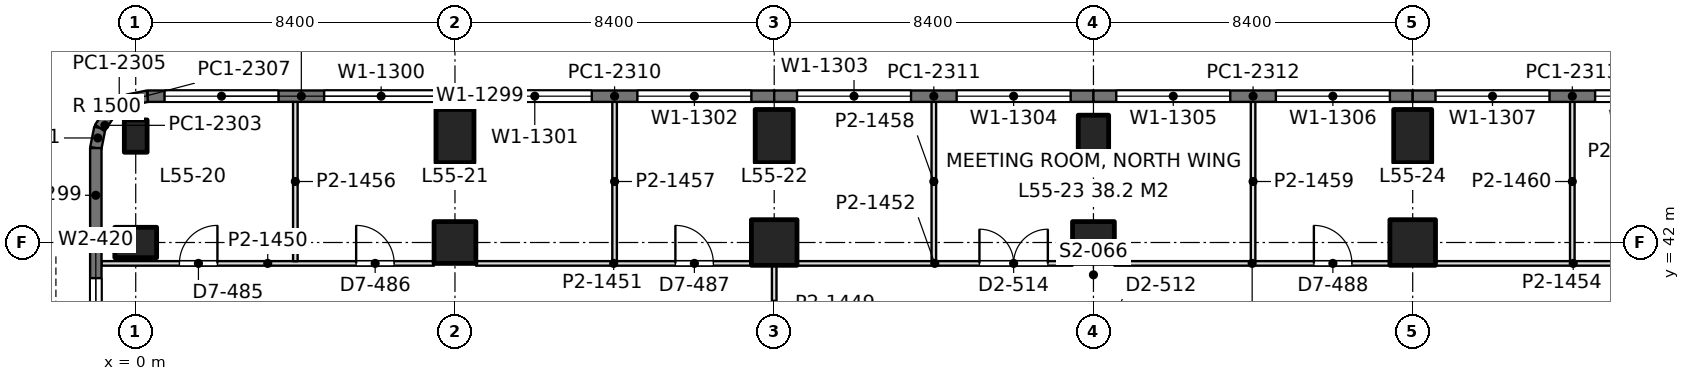
"""IFC4 building model, lengths in metres.
Left out: names, types, materials, properties, quantities, classifications, styles, units other than length and angle.
Written with IfcOpenShell. Run it as: python <this file> out.ifc"""

import sys

from ifc_helpers import new_model, si_unit, direction, frame, frame_2d, origin, origin_2d, place, context, subcontext, project, spatial, rectangle, extrude, element, fill, save


model = new_model("IFC4")
c1 = context("Model", 3, precision=1e-05, world=origin(), true_north=direction((0.0, 1.0)))
c2 = subcontext(c1, "Body", "Model", "MODEL_VIEW")
j1 = project(units=[si_unit("LENGTHUNIT", "METRE"), si_unit("PLANEANGLEUNIT", "RADIAN")], contexts=[c1])
p1 = place(None, origin())
s1 = spatial("IfcSite", under=j1, at=p1, CompositionType="ELEMENT")
p2 = place(p1, origin())
s2 = spatial("IfcBuilding", under=s1, at=p2, CompositionType="ELEMENT")
p3 = place(p2, frame((0.0, 0.0, 240.6)))
s3 = spatial("IfcBuildingStorey", under=s2, at=p3, CompositionType="ELEMENT", Elevation=240.6)
p4 = place(p3, frame((0.0, 42.0, 0.0), z_axis=(0.0, 0.0, 1.0), x_axis=(0.0, 1.0, 0.0)))
e1 = element("IfcColumn", 1, at=p4, inside=s3, PredefinedType="COLUMN", context=c2, shape_type="SweptSolid", body=[
    extrude(rectangle(XDim=0.8, YDim=1.1, at=origin_2d()), origin(), (0.0, 0.0, 1.0), 4.2),
])
p5 = place(p3, frame((0.0, 44.8, 0.0), z_axis=(0.0, 0.0, 1.0), x_axis=(1.0, 0.0, 0.0)))
e2 = element("IfcColumn", 2, at=p5, inside=s3, PredefinedType="COLUMN", context=c2, shape_type="SweptSolid", body=[
    extrude(rectangle(XDim=0.6, YDim=0.85, at=origin_2d()), origin(), (0.0, 0.0, 1.0), 4.2),
])
p6 = place(p3, frame((8.4, 42.0, 0.0), z_axis=(0.0, 0.0, 1.0), x_axis=(1.0, 0.0, 0.0)))
e3 = element("IfcColumn", 3, at=p6, inside=s3, PredefinedType="COLUMN", context=c2, shape_type="SweptSolid", body=[
    extrude(rectangle(XDim=1.1, YDim=1.1, at=origin_2d()), origin(), (0.0, 0.0, 1.0), 4.2),
])
p7 = place(p3, frame((8.4, 44.8, 0.0), z_axis=(0.0, 0.0, 1.0), x_axis=(1.0, 0.0, 0.0)))
e4 = element("IfcColumn", 4, at=p7, inside=s3, PredefinedType="COLUMN", context=c2, shape_type="SweptSolid", body=[
    extrude(rectangle(XDim=1.0, YDim=1.4, at=origin_2d()), origin(), (0.0, 0.0, 1.0), 4.2),
])
p8 = place(p3, frame((16.8, 42.0, 0.0), z_axis=(0.0, 0.0, 1.0), x_axis=(1.0, 0.0, 0.0)))
e5 = element("IfcColumn", 5, at=p8, inside=s3, PredefinedType="COLUMN", context=c2, shape_type="SweptSolid", body=[
    extrude(rectangle(XDim=1.2, YDim=1.2, at=origin_2d()), origin(), (0.0, 0.0, 1.0), 4.2),
])
p9 = place(p3, frame((16.8, 44.8, 0.0), z_axis=(0.0, 0.0, 1.0), x_axis=(1.0, 0.0, 0.0)))
e6 = element("IfcColumn", 6, at=p9, inside=s3, PredefinedType="COLUMN", context=c2, shape_type="SweptSolid", body=[
    extrude(rectangle(XDim=1.0, YDim=1.4, at=origin_2d()), origin(), (0.0, 0.0, 1.0), 4.2),
])
p10 = place(p3, frame((25.2, 42.0, 0.0), z_axis=(0.0, 0.0, 1.0), x_axis=(1.0, 0.0, 0.0)))
e7 = element("IfcColumn", 7, at=p10, inside=s3, PredefinedType="COLUMN", context=c2, shape_type="SweptSolid", body=[
    extrude(rectangle(XDim=1.1, YDim=1.1, at=origin_2d()), origin(), (0.0, 0.0, 1.0), 4.2),
])
p11 = place(p3, frame((25.2, 44.8, 0.0), z_axis=(0.0, 0.0, 1.0), x_axis=(1.0, 0.0, 0.0)))
e8 = element("IfcColumn", 8, at=p11, inside=s3, PredefinedType="COLUMN", context=c2, shape_type="SweptSolid", body=[
    extrude(rectangle(XDim=0.8, YDim=1.1, at=origin_2d()), origin(), (0.0, 0.0, 1.0), 4.2),
])
p12 = place(p3, frame((33.6, 42.0, 0.0), z_axis=(0.0, 0.0, 1.0), x_axis=(1.0, 0.0, 0.0)))
e9 = element("IfcColumn", 9, at=p12, inside=s3, PredefinedType="COLUMN", context=c2, shape_type="SweptSolid", body=[
    extrude(rectangle(XDim=1.2, YDim=1.2, at=origin_2d()), origin(), (0.0, 0.0, 1.0), 4.2),
])
p13 = place(p3, frame((33.6, 44.8, 0.0), z_axis=(0.0, 0.0, 1.0), x_axis=(1.0, 0.0, 0.0)))
e10 = element("IfcColumn", 10, at=p13, inside=s3, PredefinedType="COLUMN", context=c2, shape_type="SweptSolid", body=[
    extrude(rectangle(XDim=1.0, YDim=1.4, at=origin_2d()), origin(), (0.0, 0.0, 1.0), 4.2),
])
p14 = place(p3, frame((-1.05, 37.725, 0.0), z_axis=(0.0, 0.0, 1.0), x_axis=(0.0, 1.0, 0.0)))
e11 = element("IfcWall", 11, at=p14, inside=s3, PredefinedType="SOLIDWALL", context=c2, shape_type="SweptSolid", body=[
    extrude(rectangle(XDim=4.275, YDim=0.3, at=frame_2d((2.137, 0.0))), origin(), (0.0, 0.0, 1.0), 4.0),
])
p15 = place(p14, frame((0.938, 0.0, 0.9)))
e12 = element("IfcOpeningElement", 12, at=p15, cuts=e11, PredefinedType="OPENING", context=c2, shape_type="SweptSolid", body=[
    extrude(rectangle(XDim=2.4, YDim=1.9, at=frame_2d((1.2, 0.95))), frame((0.0, 0.16, 0.0), z_axis=(0.0, -1.0, 0.0), x_axis=(1.0, 0.0, 0.0)), (0.0, 0.0, 1.0), 0.32),
])
p16 = place(p3, frame((-1.05, 42.0, 0.0), z_axis=(0.0, 0.0, 1.0), x_axis=(0.0, 1.0, 0.0)))
e13 = element("IfcWall", 13, at=p16, inside=s3, PredefinedType="SOLIDWALL", context=c2, shape_type="SweptSolid", body=[
    extrude(rectangle(XDim=2.485, YDim=0.3, at=frame_2d((1.243, 0.0))), origin(), (0.0, 0.0, 1.0), 4.0),
])
p17 = place(p3, frame((-1.05, 44.485, 0.0), z_axis=(0.0, 0.0, 1.0), x_axis=(0.195073962632, 0.980788534345, 0.0)))
e14 = element("IfcWall", 14, at=p17, inside=s3, PredefinedType="SOLIDWALL", context=c2, shape_type="SweptSolid", body=[
    extrude(rectangle(XDim=0.541, YDim=0.3, at=frame_2d((0.271, 0.0))), origin(), (0.0, 0.0, 1.0), 4.0),
])
p18 = place(p3, frame((-0.945, 45.015, 0.0), z_axis=(0.0, 0.0, 1.0), x_axis=(0.55534295404, 0.831621430339, 0.0)))
e15 = element("IfcWall", 15, at=p18, inside=s3, PredefinedType="SOLIDWALL", context=c2, shape_type="SweptSolid", body=[
    extrude(rectangle(XDim=0.526, YDim=0.3, at=frame_2d((0.263, 0.0))), origin(), (0.0, 0.0, 1.0), 4.0),
])
p19 = place(p3, frame((-0.653, 45.453, 0.0), z_axis=(0.0, 0.0, 1.0), x_axis=(0.831692711774, 0.555236195849, 0.0)))
e16 = element("IfcWall", 16, at=p19, inside=s3, PredefinedType="SOLIDWALL", context=c2, shape_type="SweptSolid", body=[
    extrude(rectangle(XDim=0.525, YDim=0.3, at=frame_2d((0.263, 0.0))), origin(), (0.0, 0.0, 1.0), 4.0),
])
p20 = place(p3, frame((-0.216, 45.744, 0.0), z_axis=(0.0, 0.0, 1.0), x_axis=(0.980702050465, 0.1955082817, 0.0)))
e17 = element("IfcWall", 17, at=p20, inside=s3, PredefinedType="SOLIDWALL", context=c2, shape_type="SweptSolid", body=[
    extrude(rectangle(XDim=0.541, YDim=0.3, at=frame_2d((0.271, 0.0))), origin(), (0.0, 0.0, 1.0), 4.0),
])
p21 = place(p3, frame((0.315, 45.85, 0.0), z_axis=(0.0, 0.0, 1.0), x_axis=(1.0, 0.0, 0.0)))
e18 = element("IfcWall", 18, at=p21, inside=s3, PredefinedType="SOLIDWALL", context=c2, shape_type="SweptSolid", body=[
    extrude(rectangle(XDim=8.085, YDim=0.3, at=frame_2d((4.042, 0.0))), origin(), (0.0, 0.0, 1.0), 4.0),
])
p22 = place(p21, frame((0.443, 0.0, 0.9)))
e19 = element("IfcOpeningElement", 19, at=p22, cuts=e18, PredefinedType="OPENING", context=c2, shape_type="SweptSolid", body=[
    extrude(rectangle(XDim=3.0, YDim=1.9, at=frame_2d((1.5, 0.95))), frame((0.0, 0.16, 0.0), z_axis=(0.0, -1.0, 0.0), x_axis=(1.0, 0.0, 0.0)), (0.0, 0.0, 1.0), 0.32),
])
p23 = place(p21, frame((4.643, 0.0, 0.9)))
e20 = element("IfcOpeningElement", 20, at=p23, cuts=e18, PredefinedType="OPENING", context=c2, shape_type="SweptSolid", body=[
    extrude(rectangle(XDim=3.0, YDim=1.9, at=frame_2d((1.5, 0.95))), frame((0.0, 0.16, 0.0), z_axis=(0.0, -1.0, 0.0), x_axis=(1.0, 0.0, 0.0)), (0.0, 0.0, 1.0), 0.32),
])
p24 = place(p3, frame((8.4, 45.85, 0.0), z_axis=(0.0, 0.0, 1.0), x_axis=(1.0, 0.0, 0.0)))
e21 = element("IfcWall", 21, at=p24, inside=s3, PredefinedType="SOLIDWALL", context=c2, shape_type="SweptSolid", body=[
    extrude(rectangle(XDim=8.4, YDim=0.3, at=frame_2d((4.2, 0.0))), origin(), (0.0, 0.0, 1.0), 4.0),
])
p25 = place(p24, frame((0.6, 0.0, 0.9)))
e22 = element("IfcOpeningElement", 22, at=p25, cuts=e21, PredefinedType="OPENING", context=c2, shape_type="SweptSolid", body=[
    extrude(rectangle(XDim=3.0, YDim=1.9, at=frame_2d((1.5, 0.95))), frame((0.0, 0.16, 0.0), z_axis=(0.0, -1.0, 0.0), x_axis=(1.0, 0.0, 0.0)), (0.0, 0.0, 1.0), 0.32),
])
p26 = place(p24, frame((4.8, 0.0, 0.9)))
e23 = element("IfcOpeningElement", 23, at=p26, cuts=e21, PredefinedType="OPENING", context=c2, shape_type="SweptSolid", body=[
    extrude(rectangle(XDim=3.0, YDim=1.9, at=frame_2d((1.5, 0.95))), frame((0.0, 0.16, 0.0), z_axis=(0.0, -1.0, 0.0), x_axis=(1.0, 0.0, 0.0)), (0.0, 0.0, 1.0), 0.32),
])
p27 = place(p3, frame((16.8, 45.85, 0.0), z_axis=(0.0, 0.0, 1.0), x_axis=(1.0, 0.0, 0.0)))
e24 = element("IfcWall", 24, at=p27, inside=s3, PredefinedType="SOLIDWALL", context=c2, shape_type="SweptSolid", body=[
    extrude(rectangle(XDim=8.4, YDim=0.3, at=frame_2d((4.2, 0.0))), origin(), (0.0, 0.0, 1.0), 4.0),
])
p28 = place(p27, frame((0.6, 0.0, 0.9)))
e25 = element("IfcOpeningElement", 25, at=p28, cuts=e24, PredefinedType="OPENING", context=c2, shape_type="SweptSolid", body=[
    extrude(rectangle(XDim=3.0, YDim=1.9, at=frame_2d((1.5, 0.95))), frame((0.0, 0.16, 0.0), z_axis=(0.0, -1.0, 0.0), x_axis=(1.0, 0.0, 0.0)), (0.0, 0.0, 1.0), 0.32),
])
p29 = place(p27, frame((4.8, 0.0, 0.9)))
e26 = element("IfcOpeningElement", 26, at=p29, cuts=e24, PredefinedType="OPENING", context=c2, shape_type="SweptSolid", body=[
    extrude(rectangle(XDim=3.0, YDim=1.9, at=frame_2d((1.5, 0.95))), frame((0.0, 0.16, 0.0), z_axis=(0.0, -1.0, 0.0), x_axis=(1.0, 0.0, 0.0)), (0.0, 0.0, 1.0), 0.32),
])
p30 = place(p3, frame((25.2, 45.85, 0.0), z_axis=(0.0, 0.0, 1.0), x_axis=(1.0, 0.0, 0.0)))
e27 = element("IfcWall", 27, at=p30, inside=s3, PredefinedType="SOLIDWALL", context=c2, shape_type="SweptSolid", body=[
    extrude(rectangle(XDim=8.4, YDim=0.3, at=frame_2d((4.2, 0.0))), origin(), (0.0, 0.0, 1.0), 4.0),
])
p31 = place(p30, frame((0.6, 0.0, 0.9)))
e28 = element("IfcOpeningElement", 28, at=p31, cuts=e27, PredefinedType="OPENING", context=c2, shape_type="SweptSolid", body=[
    extrude(rectangle(XDim=3.0, YDim=1.9, at=frame_2d((1.5, 0.95))), frame((0.0, 0.16, 0.0), z_axis=(0.0, -1.0, 0.0), x_axis=(1.0, 0.0, 0.0)), (0.0, 0.0, 1.0), 0.32),
])
p32 = place(p30, frame((4.8, 0.0, 0.9)))
e29 = element("IfcOpeningElement", 29, at=p32, cuts=e27, PredefinedType="OPENING", context=c2, shape_type="SweptSolid", body=[
    extrude(rectangle(XDim=3.0, YDim=1.9, at=frame_2d((1.5, 0.95))), frame((0.0, 0.16, 0.0), z_axis=(0.0, -1.0, 0.0), x_axis=(1.0, 0.0, 0.0)), (0.0, 0.0, 1.0), 0.32),
])
p33 = place(p3, frame((33.6, 45.85, 0.0), z_axis=(0.0, 0.0, 1.0), x_axis=(1.0, 0.0, 0.0)))
e30 = element("IfcWall", 30, at=p33, inside=s3, PredefinedType="SOLIDWALL", context=c2, shape_type="SweptSolid", body=[
    extrude(rectangle(XDim=8.4, YDim=0.3, at=frame_2d((4.2, 0.0))), origin(), (0.0, 0.0, 1.0), 4.0),
])
p34 = place(p33, frame((0.6, 0.0, 0.9)))
e31 = element("IfcOpeningElement", 31, at=p34, cuts=e30, PredefinedType="OPENING", context=c2, shape_type="SweptSolid", body=[
    extrude(rectangle(XDim=3.0, YDim=1.9, at=frame_2d((1.5, 0.95))), frame((0.0, 0.16, 0.0), z_axis=(0.0, -1.0, 0.0), x_axis=(1.0, 0.0, 0.0)), (0.0, 0.0, 1.0), 0.32),
])
p35 = place(p33, frame((4.8, 0.0, 0.9)))
e32 = element("IfcOpeningElement", 32, at=p35, cuts=e30, PredefinedType="OPENING", context=c2, shape_type="SweptSolid", body=[
    extrude(rectangle(XDim=3.0, YDim=1.9, at=frame_2d((1.5, 0.95))), frame((0.0, 0.16, 0.0), z_axis=(0.0, -1.0, 0.0), x_axis=(1.0, 0.0, 0.0)), (0.0, 0.0, 1.0), 0.32),
])
p36 = place(p3, frame((-0.902, 41.45, 0.0), z_axis=(0.0, 0.0, 1.0), x_axis=(1.0, 0.0, 0.0)))
e33 = element("IfcWall", 33, at=p36, inside=s3, PredefinedType="PARTITIONING", context=c2, shape_type="SweptSolid", body=[
    extrude(rectangle(XDim=8.751, YDim=0.12, at=frame_2d((4.375, 0.0))), origin(), (0.0, 0.0, 1.0), 3.4),
])
p37 = place(p36, frame((2.052, 0.0, 0.0)))
e34 = element("IfcOpeningElement", 34, at=p37, cuts=e33, PredefinedType="OPENING", context=c2, shape_type="SweptSolid", body=[
    extrude(rectangle(XDim=1.0, YDim=2.4, at=frame_2d((0.5, 1.2))), frame((0.0, 0.07, 0.0), z_axis=(0.0, -1.0, 0.0), x_axis=(1.0, 0.0, 0.0)), (0.0, 0.0, 1.0), 0.14),
])
p38 = place(p36, frame((6.702, 0.0, 0.0)))
e35 = element("IfcOpeningElement", 35, at=p38, cuts=e33, PredefinedType="OPENING", context=c2, shape_type="SweptSolid", body=[
    extrude(rectangle(XDim=1.0, YDim=2.4, at=frame_2d((0.5, 1.2))), frame((0.0, 0.07, 0.0), z_axis=(0.0, -1.0, 0.0), x_axis=(1.0, 0.0, 0.0)), (0.0, 0.0, 1.0), 0.14),
])
p39 = place(p3, frame((8.951, 41.45, 0.0), z_axis=(0.0, 0.0, 1.0), x_axis=(1.0, 0.0, 0.0)))
e36 = element("IfcWall", 36, at=p39, inside=s3, PredefinedType="PARTITIONING", context=c2, shape_type="SweptSolid", body=[
    extrude(rectangle(XDim=7.25, YDim=0.12, at=frame_2d((3.625, 0.0))), origin(), (0.0, 0.0, 1.0), 3.4),
])
p40 = place(p39, frame((5.249, 0.0, 0.0)))
e37 = element("IfcOpeningElement", 37, at=p40, cuts=e36, PredefinedType="OPENING", context=c2, shape_type="SweptSolid", body=[
    extrude(rectangle(XDim=1.0, YDim=2.4, at=frame_2d((0.5, 1.2))), frame((0.0, 0.07, 0.0), z_axis=(0.0, -1.0, 0.0), x_axis=(1.0, 0.0, 0.0)), (0.0, 0.0, 1.0), 0.14),
])
p41 = place(p3, frame((17.399, 41.45, 0.0), z_axis=(0.0, 0.0, 1.0), x_axis=(1.0, 0.0, 0.0)))
e38 = element("IfcWall", 38, at=p41, inside=s3, PredefinedType="PARTITIONING", context=c2, shape_type="SweptSolid", body=[
    extrude(rectangle(XDim=7.25, YDim=0.12, at=frame_2d((3.625, 0.0))), origin(), (0.0, 0.0, 1.0), 3.4),
])
p42 = place(p41, frame((4.801, 0.0, 0.0)))
e39 = element("IfcOpeningElement", 39, at=p42, cuts=e38, PredefinedType="OPENING", context=c2, shape_type="SweptSolid", body=[
    extrude(rectangle(XDim=1.8, YDim=2.2, at=frame_2d((0.9, 1.1))), frame((0.0, 0.07, 0.0), z_axis=(0.0, -1.0, 0.0), x_axis=(1.0, 0.0, 0.0)), (0.0, 0.0, 1.0), 0.14),
])
p43 = place(p3, frame((25.751, 41.45, 0.0), z_axis=(0.0, 0.0, 1.0), x_axis=(1.0, 0.0, 0.0)))
e40 = element("IfcWall", 40, at=p43, inside=s3, PredefinedType="PARTITIONING", context=c2, shape_type="SweptSolid", body=[
    extrude(rectangle(XDim=7.25, YDim=0.12, at=frame_2d((3.625, 0.0))), origin(), (0.0, 0.0, 1.0), 3.4),
])
p44 = place(p43, frame((5.249, 0.0, 0.0)))
e41 = element("IfcOpeningElement", 41, at=p44, cuts=e40, PredefinedType="OPENING", context=c2, shape_type="SweptSolid", body=[
    extrude(rectangle(XDim=1.0, YDim=2.4, at=frame_2d((0.5, 1.2))), frame((0.0, 0.07, 0.0), z_axis=(0.0, -1.0, 0.0), x_axis=(1.0, 0.0, 0.0)), (0.0, 0.0, 1.0), 0.14),
])
p45 = place(p3, frame((34.199, 41.45, 0.0), z_axis=(0.0, 0.0, 1.0), x_axis=(1.0, 0.0, 0.0)))
e42 = element("IfcWall", 42, at=p45, inside=s3, PredefinedType="PARTITIONING", context=c2, shape_type="SweptSolid", body=[
    extrude(rectangle(XDim=7.25, YDim=0.12, at=frame_2d((3.625, 0.0))), origin(), (0.0, 0.0, 1.0), 3.4),
])
p46 = place(p45, frame((5.201, 0.0, 0.0)))
e43 = element("IfcOpeningElement", 43, at=p46, cuts=e42, PredefinedType="OPENING", context=c2, shape_type="SweptSolid", body=[
    extrude(rectangle(XDim=1.0, YDim=2.4, at=frame_2d((0.5, 1.2))), frame((0.0, 0.07, 0.0), z_axis=(0.0, -1.0, 0.0), x_axis=(1.0, 0.0, 0.0)), (0.0, 0.0, 1.0), 0.14),
])
for number, where, z_axis, x_axis in (
    (44, (4.2, 41.508, 0.0), (0.0, 0.0, 1.0), (0.0, 1.0, 0.0)),
    (45, (12.6, 41.508, 0.0), (0.0, 0.0, 1.0), (0.0, 1.0, 0.0)),
    (46, (21.0, 41.508, 0.0), (0.0, 0.0, 1.0), (0.0, 1.0, 0.0)),
    (47, (29.4, 41.508, 0.0), (0.0, 0.0, 1.0), (0.0, 1.0, 0.0)),
    (48, (37.8, 41.508, 0.0), (0.0, 0.0, 1.0), (0.0, 1.0, 0.0)),
):
    element("IfcWall", number, at=place(p3, frame(where, z_axis=z_axis, x_axis=x_axis)), inside=s3, PredefinedType="PARTITIONING", context=c2, shape_type="SweptSolid", body=[
        extrude(rectangle(XDim=4.194, YDim=0.12, at=frame_2d((2.097, 0.0))), origin(), (0.0, 0.0, 1.0), 3.3),
    ])
p47 = place(p3, frame((16.8, 39.358, 0.0), z_axis=(0.0, 0.0, 1.0), x_axis=(0.0, 1.0, 0.0)))
e49 = element("IfcWall", 49, at=p47, inside=s3, PredefinedType="PARTITIONING", context=c2, shape_type="SweptSolid", body=[
    extrude(rectangle(XDim=2.043, YDim=0.12, at=frame_2d((1.021, 0.0))), origin(), (0.0, 0.0, 1.0), 3.543),
])
p48 = place(p15, origin())
e50 = element("IfcWindow", 50, at=p48, inside=s3, PartitioningType="SINGLE_PANEL", PredefinedType="WINDOW", context=c2, shape_type="SweptSolid", body=[
    extrude(rectangle(XDim=2.4, YDim=1.9, at=frame_2d((1.2, 0.95))), frame((0.0, 0.03, 0.0), z_axis=(0.0, -1.0, 0.0), x_axis=(1.0, 0.0, 0.0)), (0.0, 0.0, 1.0), 0.06),
])
fill(e12, e50)
p49 = place(p22, origin())
e51 = element("IfcWindow", 51, at=p49, inside=s3, PartitioningType="SINGLE_PANEL", PredefinedType="WINDOW", context=c2, shape_type="SweptSolid", body=[
    extrude(rectangle(XDim=3.0, YDim=1.9, at=frame_2d((1.5, 0.95))), frame((0.0, 0.03, 0.0), z_axis=(0.0, -1.0, 0.0), x_axis=(1.0, 0.0, 0.0)), (0.0, 0.0, 1.0), 0.06),
])
fill(e19, e51)
p50 = place(p23, origin())
e52 = element("IfcWindow", 52, at=p50, inside=s3, PartitioningType="SINGLE_PANEL", PredefinedType="WINDOW", context=c2, shape_type="SweptSolid", body=[
    extrude(rectangle(XDim=3.0, YDim=1.9, at=frame_2d((1.5, 0.95))), frame((0.0, 0.03, 0.0), z_axis=(0.0, -1.0, 0.0), x_axis=(1.0, 0.0, 0.0)), (0.0, 0.0, 1.0), 0.06),
])
fill(e20, e52)
p51 = place(p25, origin())
e53 = element("IfcWindow", 53, at=p51, inside=s3, PartitioningType="SINGLE_PANEL", PredefinedType="WINDOW", context=c2, shape_type="SweptSolid", body=[
    extrude(rectangle(XDim=3.0, YDim=1.9, at=frame_2d((1.5, 0.95))), frame((0.0, 0.03, 0.0), z_axis=(0.0, -1.0, 0.0), x_axis=(1.0, 0.0, 0.0)), (0.0, 0.0, 1.0), 0.06),
])
fill(e22, e53)
p52 = place(p26, origin())
e54 = element("IfcWindow", 54, at=p52, inside=s3, PartitioningType="SINGLE_PANEL", PredefinedType="WINDOW", context=c2, shape_type="SweptSolid", body=[
    extrude(rectangle(XDim=3.0, YDim=1.9, at=frame_2d((1.5, 0.95))), frame((0.0, 0.03, 0.0), z_axis=(0.0, -1.0, 0.0), x_axis=(1.0, 0.0, 0.0)), (0.0, 0.0, 1.0), 0.06),
])
fill(e23, e54)
p53 = place(p28, origin())
e55 = element("IfcWindow", 55, at=p53, inside=s3, PartitioningType="SINGLE_PANEL", PredefinedType="WINDOW", context=c2, shape_type="SweptSolid", body=[
    extrude(rectangle(XDim=3.0, YDim=1.9, at=frame_2d((1.5, 0.95))), frame((0.0, 0.03, 0.0), z_axis=(0.0, -1.0, 0.0), x_axis=(1.0, 0.0, 0.0)), (0.0, 0.0, 1.0), 0.06),
])
fill(e25, e55)
p54 = place(p29, origin())
e56 = element("IfcWindow", 56, at=p54, inside=s3, PartitioningType="SINGLE_PANEL", PredefinedType="WINDOW", context=c2, shape_type="SweptSolid", body=[
    extrude(rectangle(XDim=3.0, YDim=1.9, at=frame_2d((1.5, 0.95))), frame((0.0, 0.03, 0.0), z_axis=(0.0, -1.0, 0.0), x_axis=(1.0, 0.0, 0.0)), (0.0, 0.0, 1.0), 0.06),
])
fill(e26, e56)
p55 = place(p31, origin())
e57 = element("IfcWindow", 57, at=p55, inside=s3, PartitioningType="SINGLE_PANEL", PredefinedType="WINDOW", context=c2, shape_type="SweptSolid", body=[
    extrude(rectangle(XDim=3.0, YDim=1.9, at=frame_2d((1.5, 0.95))), frame((0.0, 0.03, 0.0), z_axis=(0.0, -1.0, 0.0), x_axis=(1.0, 0.0, 0.0)), (0.0, 0.0, 1.0), 0.06),
])
fill(e28, e57)
p56 = place(p32, origin())
e58 = element("IfcWindow", 58, at=p56, inside=s3, PartitioningType="SINGLE_PANEL", PredefinedType="WINDOW", context=c2, shape_type="SweptSolid", body=[
    extrude(rectangle(XDim=3.0, YDim=1.9, at=frame_2d((1.5, 0.95))), frame((0.0, 0.03, 0.0), z_axis=(0.0, -1.0, 0.0), x_axis=(1.0, 0.0, 0.0)), (0.0, 0.0, 1.0), 0.06),
])
fill(e29, e58)
p57 = place(p34, origin())
e59 = element("IfcWindow", 59, at=p57, inside=s3, PartitioningType="SINGLE_PANEL", PredefinedType="WINDOW", context=c2, shape_type="SweptSolid", body=[
    extrude(rectangle(XDim=3.0, YDim=1.9, at=frame_2d((1.5, 0.95))), frame((0.0, 0.03, 0.0), z_axis=(0.0, -1.0, 0.0), x_axis=(1.0, 0.0, 0.0)), (0.0, 0.0, 1.0), 0.06),
])
fill(e31, e59)
p58 = place(p35, origin())
e60 = element("IfcWindow", 60, at=p58, inside=s3, PartitioningType="SINGLE_PANEL", PredefinedType="WINDOW", context=c2, shape_type="SweptSolid", body=[
    extrude(rectangle(XDim=3.0, YDim=1.9, at=frame_2d((1.5, 0.95))), frame((0.0, 0.03, 0.0), z_axis=(0.0, -1.0, 0.0), x_axis=(1.0, 0.0, 0.0)), (0.0, 0.0, 1.0), 0.06),
])
fill(e32, e60)
p59 = place(p37, origin())
e61 = element("IfcDoor", 61, at=p59, inside=s3, OperationType="SINGLE_SWING_RIGHT", PredefinedType="DOOR", context=c2, shape_type="SweptSolid", body=[
    extrude(rectangle(XDim=1.0, YDim=2.4, at=frame_2d((0.5, 1.2))), frame((0.0, 0.025, 0.0), z_axis=(0.0, -1.0, 0.0), x_axis=(1.0, 0.0, 0.0)), (0.0, 0.0, 1.0), 0.05),
])
fill(e34, e61)
p60 = place(p38, origin())
e62 = element("IfcDoor", 62, at=p60, inside=s3, OperationType="SINGLE_SWING_LEFT", PredefinedType="DOOR", context=c2, shape_type="SweptSolid", body=[
    extrude(rectangle(XDim=1.0, YDim=2.4, at=frame_2d((0.5, 1.2))), frame((0.0, 0.025, 0.0), z_axis=(0.0, -1.0, 0.0), x_axis=(1.0, 0.0, 0.0)), (0.0, 0.0, 1.0), 0.05),
])
fill(e35, e62)
p61 = place(p40, origin())
e63 = element("IfcDoor", 63, at=p61, inside=s3, OperationType="SINGLE_SWING_LEFT", PredefinedType="DOOR", context=c2, shape_type="SweptSolid", body=[
    extrude(rectangle(XDim=1.0, YDim=2.4, at=frame_2d((0.5, 1.2))), frame((0.0, 0.025, 0.0), z_axis=(0.0, -1.0, 0.0), x_axis=(1.0, 0.0, 0.0)), (0.0, 0.0, 1.0), 0.05),
])
fill(e37, e63)
p62 = place(p42, origin())
e64 = element("IfcDoor", 64, at=p62, inside=s3, OperationType="DOUBLE_DOOR_SINGLE_SWING", PredefinedType="DOOR", context=c2, shape_type="SweptSolid", body=[
    extrude(rectangle(XDim=1.8, YDim=2.2, at=frame_2d((0.9, 1.1))), frame((0.0, 0.025, 0.0), z_axis=(0.0, -1.0, 0.0), x_axis=(1.0, 0.0, 0.0)), (0.0, 0.0, 1.0), 0.05),
])
fill(e39, e64)
p63 = place(p44, origin())
e65 = element("IfcDoor", 65, at=p63, inside=s3, OperationType="SINGLE_SWING_LEFT", PredefinedType="DOOR", context=c2, shape_type="SweptSolid", body=[
    extrude(rectangle(XDim=1.0, YDim=2.4, at=frame_2d((0.5, 1.2))), frame((0.0, 0.025, 0.0), z_axis=(0.0, -1.0, 0.0), x_axis=(1.0, 0.0, 0.0)), (0.0, 0.0, 1.0), 0.05),
])
fill(e41, e65)
save(model, sys.argv[1])
